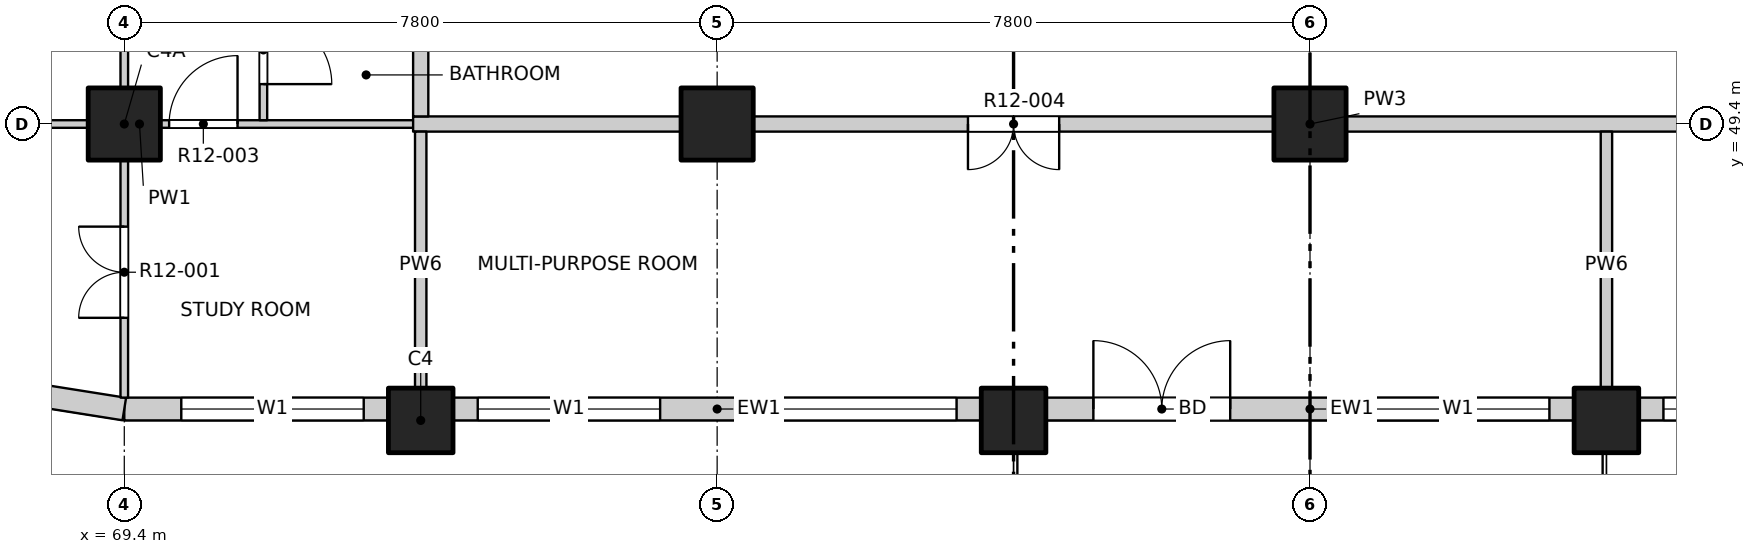
"""IFC4 building model, lengths in metres.
Left out: names, types, materials, properties, quantities, classifications, styles, units other than length and angle.
Written with IfcOpenShell. Run it as: python <this file> out.ifc"""

import sys

from ifc_helpers import new_model, si_unit, direction, frame, frame_2d, origin, origin_2d, place, context, subcontext, project, spatial, rectangle, extrude, element, fill, save


model = new_model("IFC4")
c1 = context("Model", 3, precision=1e-05, world=origin(), true_north=direction((0.0, 1.0)))
c2 = subcontext(c1, "Body", "Model", "MODEL_VIEW")
j1 = project(units=[si_unit("LENGTHUNIT", "METRE"), si_unit("PLANEANGLEUNIT", "RADIAN")], contexts=[c1])
p1 = place(None, origin())
s1 = spatial("IfcSite", under=j1, at=p1, CompositionType="ELEMENT")
p2 = place(p1, origin())
s2 = spatial("IfcBuilding", under=s1, at=p2, CompositionType="ELEMENT")
p3 = place(p2, frame((0.0, 0.0, 137.3)))
s3 = spatial("IfcBuildingStorey", under=s2, at=p3, CompositionType="ELEMENT", Elevation=137.3)
for number, where, z_axis, x_axis in (
    (1, (73.3, 45.5, -0.25), (0.0, 0.0, 1.0), (1.0, 0.0, 0.0)),
    (2, (81.1, 45.5, -0.25), (0.0, 0.0, 1.0), (1.0, 0.0, 0.0)),
    (3, (88.9, 45.5, -0.25), (0.0, 0.0, 1.0), (1.0, 0.0, 0.0)),
):
    element("IfcColumn", number, at=place(p3, frame(where, z_axis=z_axis, x_axis=x_axis)), inside=s3, PredefinedType="COLUMN", context=c2, shape_type="SweptSolid", body=[
        extrude(rectangle(XDim=0.85, YDim=0.85, at=origin_2d()), origin(), (0.0, 0.0, 1.0), 3.4),
    ])
for number, where, z_axis, x_axis in (
    (4, (69.4, 49.4, -0.25), (0.0, 0.0, 1.0), (1.0, 0.0, 0.0)),
    (5, (77.2, 49.4, -0.25), (0.0, 0.0, 1.0), (1.0, 0.0, 0.0)),
    (6, (85.0, 49.4, -0.25), (0.0, 0.0, 1.0), (1.0, 0.0, 0.0)),
):
    element("IfcColumn", number, at=place(p3, frame(where, z_axis=z_axis, x_axis=x_axis)), inside=s3, PredefinedType="COLUMN", context=c2, shape_type="SweptSolid", body=[
        extrude(rectangle(XDim=0.95, YDim=0.95, at=origin_2d()), origin(), (0.0, 0.0, 1.0), 3.4),
    ])
p4 = place(p3, frame((69.4, 45.65, 0.0), z_axis=(0.0, 0.0, 1.0), x_axis=(1.0, 0.0, 0.0)))
e7 = element("IfcWall", 7, at=p4, inside=s3, PredefinedType="SOLIDWALL", context=c2, shape_type="SweptSolid", body=[
    extrude(rectangle(XDim=3.475, YDim=0.3, at=frame_2d((1.738, 0.0))), origin(), (0.0, 0.0, 1.0), 2.7),
])
p5 = place(p4, frame((0.75, 0.0, 0.9)))
e8 = element("IfcOpeningElement", 8, at=p5, cuts=e7, PredefinedType="OPENING", context=c2, shape_type="SweptSolid", body=[
    extrude(rectangle(XDim=2.4, YDim=1.8, at=frame_2d((1.2, 0.9))), frame((0.0, 0.16, 0.0), z_axis=(0.0, -1.0, 0.0), x_axis=(1.0, 0.0, 0.0)), (0.0, 0.0, 1.0), 0.32),
])
p6 = place(p3, frame((73.725, 45.65, 0.0), z_axis=(0.0, 0.0, 1.0), x_axis=(1.0, 0.0, 0.0)))
e9 = element("IfcWall", 9, at=p6, inside=s3, PredefinedType="SOLIDWALL", context=c2, shape_type="SweptSolid", body=[
    extrude(rectangle(XDim=6.95, YDim=0.3, at=frame_2d((3.475, 0.0))), origin(), (0.0, 0.0, 1.0), 2.7),
])
p7 = place(p6, frame((0.325, 0.0, 0.9)))
e10 = element("IfcOpeningElement", 10, at=p7, cuts=e9, PredefinedType="OPENING", context=c2, shape_type="SweptSolid", body=[
    extrude(rectangle(XDim=2.4, YDim=1.8, at=frame_2d((1.2, 0.9))), frame((0.0, 0.16, 0.0), z_axis=(0.0, -1.0, 0.0), x_axis=(1.0, 0.0, 0.0)), (0.0, 0.0, 1.0), 0.32),
])
p8 = place(p6, frame((4.225, 0.0, 0.9)))
e11 = element("IfcOpeningElement", 11, at=p8, cuts=e9, PredefinedType="OPENING", context=c2, shape_type="SweptSolid", body=[
    extrude(rectangle(XDim=2.4, YDim=1.8, at=frame_2d((1.2, 0.9))), frame((0.0, 0.16, 0.0), z_axis=(0.0, -1.0, 0.0), x_axis=(1.0, 0.0, 0.0)), (0.0, 0.0, 1.0), 0.32),
])
p9 = place(p3, frame((81.525, 45.65, 0.0), z_axis=(0.0, 0.0, 1.0), x_axis=(1.0, 0.0, 0.0)))
e12 = element("IfcWall", 12, at=p9, inside=s3, PredefinedType="SOLIDWALL", context=c2, shape_type="SweptSolid", body=[
    extrude(rectangle(XDim=6.95, YDim=0.3, at=frame_2d((3.475, 0.0))), origin(), (0.0, 0.0, 1.0), 2.7),
])
p10 = place(p9, frame((0.625, 0.0, 0.0)))
e13 = element("IfcOpeningElement", 13, at=p10, cuts=e12, PredefinedType="OPENING", context=c2, shape_type="SweptSolid", body=[
    extrude(rectangle(XDim=1.8, YDim=2.4, at=frame_2d((0.9, 1.2))), frame((0.0, 0.16, 0.0), z_axis=(0.0, -1.0, 0.0), x_axis=(1.0, 0.0, 0.0)), (0.0, 0.0, 1.0), 0.32),
])
p11 = place(p9, frame((4.225, 0.0, 0.9)))
e14 = element("IfcOpeningElement", 14, at=p11, cuts=e12, PredefinedType="OPENING", context=c2, shape_type="SweptSolid", body=[
    extrude(rectangle(XDim=2.4, YDim=1.8, at=frame_2d((1.2, 0.9))), frame((0.0, 0.16, 0.0), z_axis=(0.0, -1.0, 0.0), x_axis=(1.0, 0.0, 0.0)), (0.0, 0.0, 1.0), 0.32),
])
p12 = place(p3, frame((89.325, 45.65, 0.0), z_axis=(0.0, 0.0, 1.0), x_axis=(1.0, 0.0, 0.0)))
e15 = element("IfcWall", 15, at=p12, inside=s3, PredefinedType="SOLIDWALL", context=c2, shape_type="SweptSolid", body=[
    extrude(rectangle(XDim=6.95, YDim=0.3, at=frame_2d((3.475, 0.0))), origin(), (0.0, 0.0, 1.0), 2.7),
])
p13 = place(p12, frame((0.325, 0.0, 0.9)))
e16 = element("IfcOpeningElement", 16, at=p13, cuts=e15, PredefinedType="OPENING", context=c2, shape_type="SweptSolid", body=[
    extrude(rectangle(XDim=2.4, YDim=1.8, at=frame_2d((1.2, 0.9))), frame((0.0, 0.16, 0.0), z_axis=(0.0, -1.0, 0.0), x_axis=(1.0, 0.0, 0.0)), (0.0, 0.0, 1.0), 0.32),
])
p14 = place(p12, frame((4.225, 0.0, 0.9)))
e17 = element("IfcOpeningElement", 17, at=p14, cuts=e15, PredefinedType="OPENING", context=c2, shape_type="SweptSolid", body=[
    extrude(rectangle(XDim=2.4, YDim=1.8, at=frame_2d((1.2, 0.9))), frame((0.0, 0.16, 0.0), z_axis=(0.0, -1.0, 0.0), x_axis=(1.0, 0.0, 0.0)), (0.0, 0.0, 1.0), 0.32),
])
p15 = place(p3, frame((68.241, 45.833, 0.0), z_axis=(0.0, 0.0, 1.0), x_axis=(0.987678452879, -0.156496880861, 0.0)))
e18 = element("IfcWall", 18, at=p15, inside=s3, PredefinedType="SOLIDWALL", context=c2, shape_type="SweptSolid", body=[
    extrude(rectangle(XDim=1.173, YDim=0.3, at=frame_2d((0.586, 0.0))), origin(), (0.0, 0.0, 1.0), 2.7),
])
p16 = place(p3, frame((65.8, 49.4, 0.0), z_axis=(0.0, 0.0, 1.0), x_axis=(1.0, 0.0, 0.0)))
e19 = element("IfcWall", 19, at=p16, inside=s3, PredefinedType="PARTITIONING", context=c2, shape_type="SweptSolid", body=[
    extrude(rectangle(XDim=7.6, YDim=0.1, at=frame_2d((3.8, 0.0))), origin(), (0.0, 0.0, 1.0), 3.15),
])
p17 = place(p16, frame((4.19, 0.0, 0.0)))
e20 = element("IfcOpeningElement", 20, at=p17, cuts=e19, PredefinedType="OPENING", context=c2, shape_type="SweptSolid", body=[
    extrude(rectangle(XDim=0.9, YDim=2.1, at=frame_2d((0.45, 1.05))), frame((0.0, 0.06, 0.0), z_axis=(0.0, -1.0, 0.0), x_axis=(1.0, 0.0, 0.0)), (0.0, 0.0, 1.0), 0.12),
])
p18 = place(p3, frame((73.2, 49.4, 0.0), z_axis=(0.0, 0.0, 1.0), x_axis=(1.0, 0.0, 0.0)))
e21 = element("IfcWall", 21, at=p18, inside=s3, PredefinedType="PARTITIONING", context=c2, shape_type="SweptSolid", body=[
    extrude(rectangle(XDim=23.6, YDim=0.2, at=frame_2d((11.8, 0.0))), origin(), (0.0, 0.0, 1.0), 3.15),
])
p19 = place(p18, frame((7.3, 0.0, 0.0)))
e22 = element("IfcOpeningElement", 22, at=p19, cuts=e21, PredefinedType="OPENING", context=c2, shape_type="SweptSolid", body=[
    extrude(rectangle(XDim=1.2, YDim=2.1, at=frame_2d((0.6, 1.05))), frame((0.0, 0.11, 0.0), z_axis=(0.0, -1.0, 0.0), x_axis=(1.0, 0.0, 0.0)), (0.0, 0.0, 1.0), 0.22),
])
p20 = place(p18, frame((17.825, 0.0, 0.0)))
e23 = element("IfcOpeningElement", 23, at=p20, cuts=e21, PredefinedType="OPENING", context=c2, shape_type="SweptSolid", body=[
    extrude(rectangle(XDim=1.2, YDim=2.1, at=frame_2d((0.6, 1.05))), frame((0.0, 0.11, 0.0), z_axis=(0.0, -1.0, 0.0), x_axis=(1.0, 0.0, 0.0)), (0.0, 0.0, 1.0), 0.22),
])
p21 = place(p3, frame((69.4, 45.8, 0.0), z_axis=(0.0, 0.0, 1.0), x_axis=(0.0, 1.0, 0.0)))
e24 = element("IfcWall", 24, at=p21, inside=s3, PredefinedType="PARTITIONING", context=c2, shape_type="SweptSolid", body=[
    extrude(rectangle(XDim=38.4, YDim=0.1, at=frame_2d((19.2, 0.0))), origin(), (0.0, 0.0, 1.0), 3.15),
])
p22 = place(p21, frame((1.05, 0.0, 0.0)))
e25 = element("IfcOpeningElement", 25, at=p22, cuts=e24, PredefinedType="OPENING", context=c2, shape_type="SweptSolid", body=[
    extrude(rectangle(XDim=1.2, YDim=2.1, at=frame_2d((0.6, 1.05))), frame((0.0, 0.06, 0.0), z_axis=(0.0, -1.0, 0.0), x_axis=(1.0, 0.0, 0.0)), (0.0, 0.0, 1.0), 0.12),
])
p23 = place(p21, frame((5.1, 0.0, 0.0)))
e26 = element("IfcOpeningElement", 26, at=p23, cuts=e24, PredefinedType="OPENING", context=c2, shape_type="SweptSolid", body=[
    extrude(rectangle(XDim=0.9, YDim=2.1, at=frame_2d((0.45, 1.05))), frame((0.0, 0.06, 0.0), z_axis=(0.0, -1.0, 0.0), x_axis=(1.0, 0.0, 0.0)), (0.0, 0.0, 1.0), 0.12),
])
p24 = place(p21, frame((9.0, 0.0, 0.0)))
e27 = element("IfcOpeningElement", 27, at=p24, cuts=e24, PredefinedType="OPENING", context=c2, shape_type="SweptSolid", body=[
    extrude(rectangle(XDim=0.9, YDim=2.1, at=frame_2d((0.45, 1.05))), frame((0.0, 0.06, 0.0), z_axis=(0.0, -1.0, 0.0), x_axis=(1.0, 0.0, 0.0)), (0.0, 0.0, 1.0), 0.12),
])
p25 = place(p21, frame((12.9, 0.0, 0.0)))
e28 = element("IfcOpeningElement", 28, at=p25, cuts=e24, PredefinedType="OPENING", context=c2, shape_type="SweptSolid", body=[
    extrude(rectangle(XDim=0.9, YDim=2.1, at=frame_2d((0.45, 1.05))), frame((0.0, 0.06, 0.0), z_axis=(0.0, -1.0, 0.0), x_axis=(1.0, 0.0, 0.0)), (0.0, 0.0, 1.0), 0.12),
])
p26 = place(p21, frame((16.8, 0.0, 0.0)))
e29 = element("IfcOpeningElement", 29, at=p26, cuts=e24, PredefinedType="OPENING", context=c2, shape_type="SweptSolid", body=[
    extrude(rectangle(XDim=0.9, YDim=2.1, at=frame_2d((0.45, 1.05))), frame((0.0, 0.06, 0.0), z_axis=(0.0, -1.0, 0.0), x_axis=(1.0, 0.0, 0.0)), (0.0, 0.0, 1.0), 0.12),
])
p27 = place(p21, frame((20.7, 0.0, 0.0)))
e30 = element("IfcOpeningElement", 30, at=p27, cuts=e24, PredefinedType="OPENING", context=c2, shape_type="SweptSolid", body=[
    extrude(rectangle(XDim=0.9, YDim=2.1, at=frame_2d((0.45, 1.05))), frame((0.0, 0.06, 0.0), z_axis=(0.0, -1.0, 0.0), x_axis=(1.0, 0.0, 0.0)), (0.0, 0.0, 1.0), 0.12),
])
p28 = place(p21, frame((24.6, 0.0, 0.0)))
e31 = element("IfcOpeningElement", 31, at=p28, cuts=e24, PredefinedType="OPENING", context=c2, shape_type="SweptSolid", body=[
    extrude(rectangle(XDim=0.9, YDim=2.1, at=frame_2d((0.45, 1.05))), frame((0.0, 0.06, 0.0), z_axis=(0.0, -1.0, 0.0), x_axis=(1.0, 0.0, 0.0)), (0.0, 0.0, 1.0), 0.12),
])
p29 = place(p21, frame((28.5, 0.0, 0.0)))
e32 = element("IfcOpeningElement", 32, at=p29, cuts=e24, PredefinedType="OPENING", context=c2, shape_type="SweptSolid", body=[
    extrude(rectangle(XDim=0.9, YDim=2.1, at=frame_2d((0.45, 1.05))), frame((0.0, 0.06, 0.0), z_axis=(0.0, -1.0, 0.0), x_axis=(1.0, 0.0, 0.0)), (0.0, 0.0, 1.0), 0.12),
])
p30 = place(p21, frame((32.4, 0.0, 0.0)))
e33 = element("IfcOpeningElement", 33, at=p30, cuts=e24, PredefinedType="OPENING", context=c2, shape_type="SweptSolid", body=[
    extrude(rectangle(XDim=0.9, YDim=2.1, at=frame_2d((0.45, 1.05))), frame((0.0, 0.06, 0.0), z_axis=(0.0, -1.0, 0.0), x_axis=(1.0, 0.0, 0.0)), (0.0, 0.0, 1.0), 0.12),
])
p31 = place(p21, frame((36.15, 0.0, 0.0)))
e34 = element("IfcOpeningElement", 34, at=p31, cuts=e24, PredefinedType="OPENING", context=c2, shape_type="SweptSolid", body=[
    extrude(rectangle(XDim=1.2, YDim=2.1, at=frame_2d((0.6, 1.05))), frame((0.0, 0.06, 0.0), z_axis=(0.0, -1.0, 0.0), x_axis=(1.0, 0.0, 0.0)), (0.0, 0.0, 1.0), 0.12),
])
p32 = place(p3, frame((71.23, 49.45, 0.0), z_axis=(0.0, 0.0, 1.0), x_axis=(0.0, 1.0, 0.0)))
e35 = element("IfcWall", 35, at=p32, inside=s3, PredefinedType="PARTITIONING", context=c2, shape_type="SweptSolid", body=[
    extrude(rectangle(XDim=5.7, YDim=0.1, at=frame_2d((2.85, 0.0))), origin(), (0.0, 0.0, 1.0), 3.15),
])
p33 = place(p32, frame((0.475, 0.0, 0.0)))
e36 = element("IfcOpeningElement", 36, at=p33, cuts=e35, PredefinedType="OPENING", context=c2, shape_type="SweptSolid", body=[
    extrude(rectangle(XDim=0.9, YDim=2.1, at=frame_2d((0.45, 1.05))), frame((0.0, 0.06, 0.0), z_axis=(0.0, -1.0, 0.0), x_axis=(1.0, 0.0, 0.0)), (0.0, 0.0, 1.0), 0.12),
])
p34 = place(p32, frame((2.525, 0.0, 0.0)))
e37 = element("IfcOpeningElement", 37, at=p34, cuts=e35, PredefinedType="OPENING", context=c2, shape_type="SweptSolid", body=[
    extrude(rectangle(XDim=0.8, YDim=2.1, at=frame_2d((0.4, 1.05))), frame((0.0, 0.06, 0.0), z_axis=(0.0, -1.0, 0.0), x_axis=(1.0, 0.0, 0.0)), (0.0, 0.0, 1.0), 0.12),
])
p35 = place(p32, frame((4.4, 0.0, 0.0)))
e38 = element("IfcOpeningElement", 38, at=p35, cuts=e35, PredefinedType="OPENING", context=c2, shape_type="SweptSolid", body=[
    extrude(rectangle(XDim=0.9, YDim=2.1, at=frame_2d((0.45, 1.05))), frame((0.0, 0.06, 0.0), z_axis=(0.0, -1.0, 0.0), x_axis=(1.0, 0.0, 0.0)), (0.0, 0.0, 1.0), 0.12),
])
p36 = place(p3, frame((73.3, 45.8, 0.0), z_axis=(0.0, 0.0, 1.0), x_axis=(0.0, 1.0, 0.0)))
e39 = element("IfcWall", 39, at=p36, inside=s3, PredefinedType="PARTITIONING", context=c2, shape_type="SweptSolid", body=[
    extrude(rectangle(XDim=3.5, YDim=0.15, at=frame_2d((1.75, 0.0))), origin(), (0.0, 0.0, 1.0), 3.15),
])
p37 = place(p3, frame((73.3, 49.5, 0.0), z_axis=(0.0, 0.0, 1.0), x_axis=(0.0, 1.0, 0.0)))
e40 = element("IfcWall", 40, at=p37, inside=s3, PredefinedType="PARTITIONING", context=c2, shape_type="SweptSolid", body=[
    extrude(rectangle(XDim=34.7, YDim=0.2, at=frame_2d((17.35, 0.0))), origin(), (0.0, 0.0, 1.0), 3.15),
])
p38 = place(p37, frame((6.975, 0.0, 0.0)))
e41 = element("IfcOpeningElement", 41, at=p38, cuts=e40, PredefinedType="OPENING", context=c2, shape_type="SweptSolid", body=[
    extrude(rectangle(XDim=1.0, YDim=2.1, at=frame_2d((0.5, 1.05))), frame((0.0, 0.11, 0.0), z_axis=(0.0, -1.0, 0.0), x_axis=(1.0, 0.0, 0.0)), (0.0, 0.0, 1.0), 0.22),
])
p39 = place(p37, frame((18.125, 0.0, 0.0)))
e42 = element("IfcOpeningElement", 42, at=p39, cuts=e40, PredefinedType="OPENING", context=c2, shape_type="SweptSolid", body=[
    extrude(rectangle(XDim=1.0, YDim=2.1, at=frame_2d((0.5, 1.05))), frame((0.0, 0.11, 0.0), z_axis=(0.0, -1.0, 0.0), x_axis=(1.0, 0.0, 0.0)), (0.0, 0.0, 1.0), 0.22),
])
p40 = place(p3, frame((88.9, 45.8, 0.0), z_axis=(0.0, 0.0, 1.0), x_axis=(0.0, 1.0, 0.0)))
e43 = element("IfcWall", 43, at=p40, inside=s3, PredefinedType="PARTITIONING", context=c2, shape_type="SweptSolid", body=[
    extrude(rectangle(XDim=3.5, YDim=0.15, at=frame_2d((1.75, 0.0))), origin(), (0.0, 0.0, 1.0), 2.55),
])
p41 = place(p5, origin())
e44 = element("IfcWindow", 44, at=p41, inside=s3, PartitioningType="DOUBLE_PANEL_VERTICAL", PredefinedType="WINDOW", context=c2, shape_type="SweptSolid", body=[
    extrude(rectangle(XDim=2.4, YDim=1.8, at=frame_2d((1.2, 0.9))), frame((0.0, 0.03, 0.0), z_axis=(0.0, -1.0, 0.0), x_axis=(1.0, 0.0, 0.0)), (0.0, 0.0, 1.0), 0.06),
])
fill(e8, e44)
p42 = place(p7, origin())
e45 = element("IfcWindow", 45, at=p42, inside=s3, PartitioningType="DOUBLE_PANEL_VERTICAL", PredefinedType="WINDOW", context=c2, shape_type="SweptSolid", body=[
    extrude(rectangle(XDim=2.4, YDim=1.8, at=frame_2d((1.2, 0.9))), frame((0.0, 0.03, 0.0), z_axis=(0.0, -1.0, 0.0), x_axis=(1.0, 0.0, 0.0)), (0.0, 0.0, 1.0), 0.06),
])
fill(e10, e45)
p43 = place(p8, origin())
e46 = element("IfcWindow", 46, at=p43, inside=s3, PartitioningType="DOUBLE_PANEL_VERTICAL", PredefinedType="WINDOW", context=c2, shape_type="SweptSolid", body=[
    extrude(rectangle(XDim=2.4, YDim=1.8, at=frame_2d((1.2, 0.9))), frame((0.0, 0.03, 0.0), z_axis=(0.0, -1.0, 0.0), x_axis=(1.0, 0.0, 0.0)), (0.0, 0.0, 1.0), 0.06),
])
fill(e11, e46)
p44 = place(p10, origin())
e47 = element("IfcDoor", 47, at=p44, inside=s3, OperationType="DOUBLE_DOOR_SINGLE_SWING", PredefinedType="DOOR", context=c2, shape_type="SweptSolid", body=[
    extrude(rectangle(XDim=1.8, YDim=2.4, at=frame_2d((0.9, 1.2))), frame((0.0, 0.025, 0.0), z_axis=(0.0, -1.0, 0.0), x_axis=(1.0, 0.0, 0.0)), (0.0, 0.0, 1.0), 0.05),
])
fill(e13, e47)
p45 = place(p11, origin())
e48 = element("IfcWindow", 48, at=p45, inside=s3, PartitioningType="DOUBLE_PANEL_VERTICAL", PredefinedType="WINDOW", context=c2, shape_type="SweptSolid", body=[
    extrude(rectangle(XDim=2.4, YDim=1.8, at=frame_2d((1.2, 0.9))), frame((0.0, 0.03, 0.0), z_axis=(0.0, -1.0, 0.0), x_axis=(1.0, 0.0, 0.0)), (0.0, 0.0, 1.0), 0.06),
])
fill(e14, e48)
p46 = place(p13, origin())
e49 = element("IfcWindow", 49, at=p46, inside=s3, PartitioningType="DOUBLE_PANEL_VERTICAL", PredefinedType="WINDOW", context=c2, shape_type="SweptSolid", body=[
    extrude(rectangle(XDim=2.4, YDim=1.8, at=frame_2d((1.2, 0.9))), frame((0.0, 0.03, 0.0), z_axis=(0.0, -1.0, 0.0), x_axis=(1.0, 0.0, 0.0)), (0.0, 0.0, 1.0), 0.06),
])
fill(e16, e49)
p47 = place(p22, origin())
e50 = element("IfcDoor", 50, at=p47, inside=s3, OperationType="DOUBLE_DOOR_SINGLE_SWING", PredefinedType="DOOR", context=c2, shape_type="SweptSolid", body=[
    extrude(rectangle(XDim=1.2, YDim=2.1, at=frame_2d((0.6, 1.05))), frame((0.0, 0.025, 0.0), z_axis=(0.0, -1.0, 0.0), x_axis=(1.0, 0.0, 0.0)), (0.0, 0.0, 1.0), 0.05),
])
fill(e25, e50)
p48 = place(p17, origin())
e51 = element("IfcDoor", 51, at=p48, inside=s3, OperationType="SINGLE_SWING_RIGHT", PredefinedType="DOOR", context=c2, shape_type="SweptSolid", body=[
    extrude(rectangle(XDim=0.9, YDim=2.1, at=frame_2d((0.45, 1.05))), frame((0.0, 0.025, 0.0), z_axis=(0.0, -1.0, 0.0), x_axis=(1.0, 0.0, 0.0)), (0.0, 0.0, 1.0), 0.05),
])
fill(e20, e51)
p49 = place(p19, origin())
e52 = element("IfcDoor", 52, at=p49, inside=s3, OperationType="DOUBLE_DOOR_SINGLE_SWING", PredefinedType="DOOR", context=c2, shape_type="SweptSolid", body=[
    extrude(rectangle(XDim=1.2, YDim=2.1, at=frame_2d((0.6, 1.05))), frame((0.0, 0.025, 0.0), z_axis=(0.0, -1.0, 0.0), x_axis=(1.0, 0.0, 0.0)), (0.0, 0.0, 1.0), 0.05),
])
fill(e22, e52)
p50 = place(p33, origin())
e53 = element("IfcDoor", 53, at=p50, inside=s3, OperationType="SINGLE_SWING_RIGHT", PredefinedType="DOOR", context=c2, shape_type="SweptSolid", body=[
    extrude(rectangle(XDim=0.9, YDim=2.1, at=frame_2d((0.45, 1.05))), frame((0.0, 0.025, 0.0), z_axis=(0.0, -1.0, 0.0), x_axis=(1.0, 0.0, 0.0)), (0.0, 0.0, 1.0), 0.05),
])
fill(e36, e53)
save(model, sys.argv[1])
